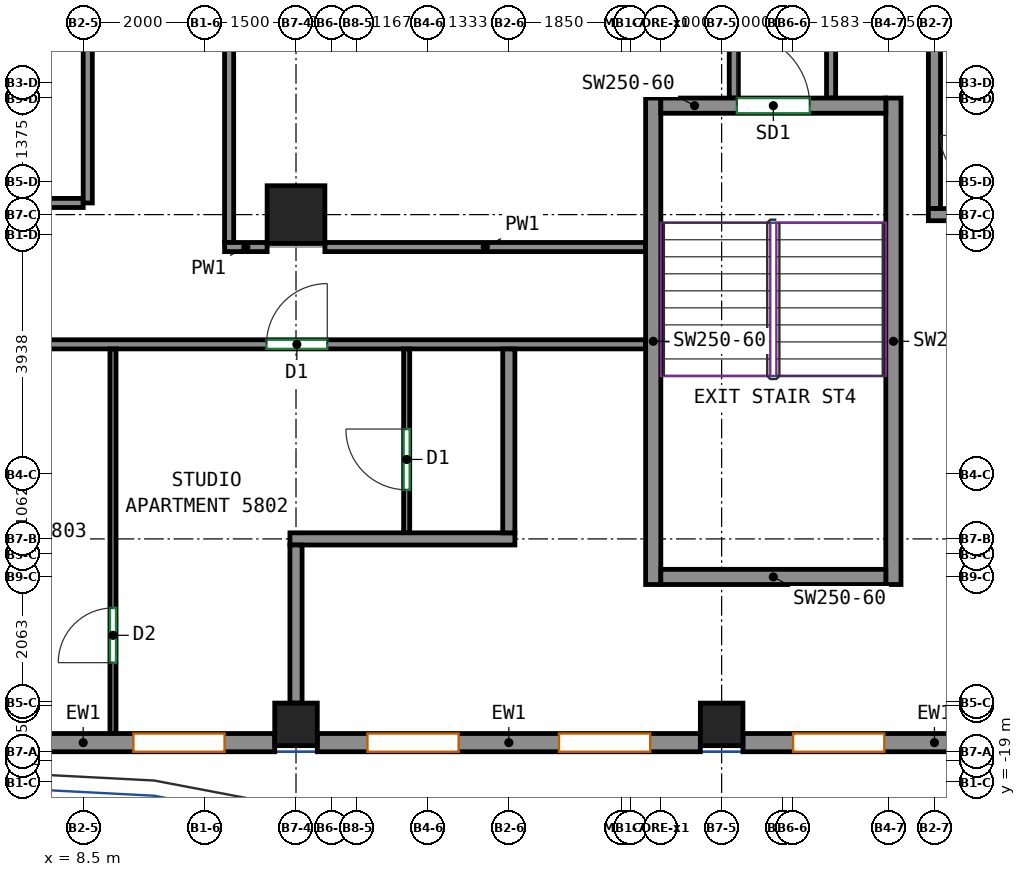
"""IFC4 building model, lengths in metres.
Left out: names, types, materials, properties, quantities, classifications, styles, units other than length and angle.
Written with IfcOpenShell. Run it as: python <this file> out.ifc"""

import sys

from ifc_helpers import new_model, si_unit, direction, frame, frame_2d, origin, origin_2d, place, context, subcontext, project, spatial, rectangle, extrude, source, transform, mapped, element, fill, save


model = new_model("IFC4")
c1 = context("Model", 3, precision=1e-05, world=origin(), true_north=direction((0.0, 1.0)))
c2 = subcontext(c1, "Body", "Model", "MODEL_VIEW")
j1 = project(units=[si_unit("LENGTHUNIT", "METRE"), si_unit("PLANEANGLEUNIT", "RADIAN")], contexts=[c1])
p1 = place(None, origin())
s1 = spatial("IfcSite", under=j1, at=p1, CompositionType="ELEMENT")
p2 = place(p1, origin())
s2 = spatial("IfcBuilding", under=s1, at=p2, CompositionType="ELEMENT")
p3 = place(p2, frame((0.0, 0.0, 242.4)))
s3 = spatial("IfcBuildingStorey", under=s2, at=p3, CompositionType="ELEMENT", Elevation=242.4)
m1 = source(origin(), c2, "Body", "SweptSolid", [
    extrude(rectangle(XDim=0.7, YDim=0.7, at=origin_2d()), origin(), (0.0, 0.0, 1.0), 3.12),
])
p4 = place(p3, frame((12.0, -18.05, 0.0), z_axis=(0.0, 0.0, 1.0), x_axis=(1.0, 0.0, 0.0)))
e1 = element("IfcColumn", 1, at=p4, inside=s3, PredefinedType="COLUMN", context=c2, shape_type="MappedRepresentation", body=[
    mapped(m1, transform((0.0, 0.0, 0.0))),
])
m2 = source(origin(), c2, "Body", "SweptSolid", [
    extrude(rectangle(XDim=0.95, YDim=0.95, at=origin_2d()), origin(), (0.0, 0.0, 1.0), 3.12),
])
p5 = place(p3, frame((12.0, -9.667, 0.0), z_axis=(0.0, 0.0, 1.0), x_axis=(1.0, 0.0, 0.0)))
e2 = element("IfcColumn", 2, at=p5, inside=s3, PredefinedType="COLUMN", context=c2, shape_type="MappedRepresentation", body=[
    mapped(m2, transform((0.0, 0.0, 0.0))),
])
p6 = place(p3, frame((19.0, -18.05, 0.0), z_axis=(0.0, 0.0, 1.0), x_axis=(1.0, 0.0, 0.0)))
e3 = element("IfcColumn", 3, at=p6, inside=s3, PredefinedType="COLUMN", context=c2, shape_type="MappedRepresentation", body=[
    mapped(m1, transform((0.0, 0.0, 0.0))),
])
m3 = source(origin(), c2, "Body", "SweptSolid", [
    extrude(rectangle(XDim=8.0, YDim=0.25, at=frame_2d((4.0, 0.0))), origin(), (0.0, 0.0, 1.0), 3.12),
])
for number, where, z_axis, x_axis in (
    (4, (17.875, -15.75, 0.0), (0.0, 0.0, 1.0), (0.0, 1.0, 0.0)),
    (5, (21.825, -15.75, 0.0), (0.0, 0.0, 1.0), (0.0, 1.0, 0.0)),
):
    element("IfcWall", number, at=place(p3, frame(where, z_axis=z_axis, x_axis=x_axis)), inside=s3, PredefinedType="SHEAR", context=c2, shape_type="MappedRepresentation", body=[
        mapped(m3, transform((0.0, 0.0, 0.0))),
    ])
m4 = source(origin(), c2, "Body", "SweptSolid", [
    extrude(rectangle(XDim=3.7, YDim=0.25, at=frame_2d((1.85, 0.0))), origin(), (0.0, 0.0, 1.0), 3.12),
])
p7 = place(p3, frame((18.0, -15.625, 0.0), z_axis=(0.0, 0.0, 1.0), x_axis=(1.0, 0.0, 0.0)))
e6 = element("IfcWall", 6, at=p7, inside=s3, PredefinedType="SHEAR", context=c2, shape_type="MappedRepresentation", body=[
    mapped(m4, transform((0.0, 0.0, 0.0))),
])
p8 = place(p3, frame((18.0, -7.875, 0.0), z_axis=(0.0, 0.0, 1.0), x_axis=(1.0, 0.0, 0.0)))
e7 = element("IfcWall", 7, at=p8, inside=s3, PredefinedType="SHEAR", context=c2, shape_type="MappedRepresentation", body=[
    mapped(m4, transform((0.0, 0.0, 0.0))),
])
p9 = place(p8, frame((1.25, 0.0, 0.0)))
e8 = element("IfcOpeningElement", 8, at=p9, cuts=e7, PredefinedType="OPENING", context=c2, shape_type="SweptSolid", body=[
    extrude(rectangle(XDim=1.2, YDim=2.1, at=frame_2d((0.6, 1.05))), frame((0.0, 0.135, 0.0), z_axis=(0.0, -1.0, 0.0), x_axis=(1.0, 0.0, 0.0)), (0.0, 0.0, 1.0), 0.27),
])
m5 = source(origin(), c2, "Body", "SweptSolid", [
    extrude(rectangle(XDim=6.3, YDim=0.3, at=frame_2d((3.15, 0.0))), origin(), (0.0, 0.0, 1.0), 3.12),
])
p10 = place(p3, frame((5.35, -18.35, 0.0), z_axis=(0.0, 0.0, 1.0), x_axis=(1.0, 0.0, 0.0)))
e9 = element("IfcWall", 9, at=p10, inside=s3, PredefinedType="SOLIDWALL", context=c2, shape_type="MappedRepresentation", body=[
    mapped(m5, transform((0.0, 0.0, 0.0))),
])
p11 = place(p10, frame((0.825, 0.0, 0.8)))
e10 = element("IfcOpeningElement", 10, at=p11, cuts=e9, PredefinedType="OPENING", context=c2, shape_type="SweptSolid", body=[
    extrude(rectangle(XDim=1.5, YDim=2.05, at=frame_2d((0.75, 1.025))), frame((0.0, 0.16, 0.0), z_axis=(0.0, -1.0, 0.0), x_axis=(1.0, 0.0, 0.0)), (0.0, 0.0, 1.0), 0.32),
])
p12 = place(p10, frame((3.975, 0.0, 0.8)))
e11 = element("IfcOpeningElement", 11, at=p12, cuts=e9, PredefinedType="OPENING", context=c2, shape_type="SweptSolid", body=[
    extrude(rectangle(XDim=1.5, YDim=2.05, at=frame_2d((0.75, 1.025))), frame((0.0, 0.16, 0.0), z_axis=(0.0, -1.0, 0.0), x_axis=(1.0, 0.0, 0.0)), (0.0, 0.0, 1.0), 0.32),
])
p13 = place(p3, frame((12.35, -18.35, 0.0), z_axis=(0.0, 0.0, 1.0), x_axis=(1.0, 0.0, 0.0)))
e12 = element("IfcWall", 12, at=p13, inside=s3, PredefinedType="SOLIDWALL", context=c2, shape_type="MappedRepresentation", body=[
    mapped(m5, transform((0.0, 0.0, 0.0))),
])
p14 = place(p13, frame((0.825, 0.0, 0.8)))
e13 = element("IfcOpeningElement", 13, at=p14, cuts=e12, PredefinedType="OPENING", context=c2, shape_type="SweptSolid", body=[
    extrude(rectangle(XDim=1.5, YDim=2.05, at=frame_2d((0.75, 1.025))), frame((0.0, 0.16, 0.0), z_axis=(0.0, -1.0, 0.0), x_axis=(1.0, 0.0, 0.0)), (0.0, 0.0, 1.0), 0.32),
])
p15 = place(p13, frame((3.975, 0.0, 0.8)))
e14 = element("IfcOpeningElement", 14, at=p15, cuts=e12, PredefinedType="OPENING", context=c2, shape_type="SweptSolid", body=[
    extrude(rectangle(XDim=1.5, YDim=2.05, at=frame_2d((0.75, 1.025))), frame((0.0, 0.16, 0.0), z_axis=(0.0, -1.0, 0.0), x_axis=(1.0, 0.0, 0.0)), (0.0, 0.0, 1.0), 0.32),
])
p16 = place(p3, frame((19.35, -18.35, 0.0), z_axis=(0.0, 0.0, 1.0), x_axis=(1.0, 0.0, 0.0)))
e15 = element("IfcWall", 15, at=p16, inside=s3, PredefinedType="SOLIDWALL", context=c2, shape_type="MappedRepresentation", body=[
    mapped(m5, transform((0.0, 0.0, 0.0))),
])
p17 = place(p16, frame((0.825, 0.0, 0.8)))
e16 = element("IfcOpeningElement", 16, at=p17, cuts=e15, PredefinedType="OPENING", context=c2, shape_type="SweptSolid", body=[
    extrude(rectangle(XDim=1.5, YDim=2.05, at=frame_2d((0.75, 1.025))), frame((0.0, 0.16, 0.0), z_axis=(0.0, -1.0, 0.0), x_axis=(1.0, 0.0, 0.0)), (0.0, 0.0, 1.0), 0.32),
])
p18 = place(p16, frame((3.975, 0.0, 0.8)))
e17 = element("IfcOpeningElement", 17, at=p18, cuts=e15, PredefinedType="OPENING", context=c2, shape_type="SweptSolid", body=[
    extrude(rectangle(XDim=1.5, YDim=2.05, at=frame_2d((0.75, 1.025))), frame((0.0, 0.16, 0.0), z_axis=(0.0, -1.0, 0.0), x_axis=(1.0, 0.0, 0.0)), (0.0, 0.0, 1.0), 0.32),
])
p19 = place(p3, frame((-11.8, -11.8, 0.0), z_axis=(0.0, 0.0, 1.0), x_axis=(1.0, 0.0, 0.0)))
e18 = element("IfcWall", 18, at=p19, inside=s3, PredefinedType="PARTITIONING", context=c2, shape_type="SweptSolid", body=[
    extrude(rectangle(XDim=29.55, YDim=0.15, at=frame_2d((14.775, 0.0))), origin(), (0.0, 0.0, 1.0), 3.12),
])
p20 = place(p19, frame((4.802, 0.0, 0.0)))
e19 = element("IfcOpeningElement", 19, at=p20, cuts=e18, PredefinedType="OPENING", context=c2, shape_type="SweptSolid", body=[
    extrude(rectangle(XDim=1.0, YDim=2.1, at=frame_2d((0.5, 1.05))), frame((0.0, 0.085, 0.0), z_axis=(0.0, -1.0, 0.0), x_axis=(1.0, 0.0, 0.0)), (0.0, 0.0, 1.0), 0.17),
])
p21 = place(p19, frame((23.314, 0.0, 0.0)))
e20 = element("IfcOpeningElement", 20, at=p21, cuts=e18, PredefinedType="OPENING", context=c2, shape_type="SweptSolid", body=[
    extrude(rectangle(XDim=1.0, YDim=2.1, at=frame_2d((0.5, 1.05))), frame((0.0, 0.085, 0.0), z_axis=(0.0, -1.0, 0.0), x_axis=(1.0, 0.0, 0.0)), (0.0, 0.0, 1.0), 0.17),
])
p22 = place(p3, frame((20.8, -7.75, 0.0), z_axis=(0.0, 0.0, 1.0), x_axis=(0.0, 1.0, 0.0)))
e21 = element("IfcWall", 21, at=p22, inside=s3, PredefinedType="PARTITIONING", context=c2, shape_type="SweptSolid", body=[
    extrude(rectangle(XDim=2.41, YDim=0.15, at=frame_2d((1.205, 0.0))), origin(), (0.0, 0.0, 1.0), 3.12),
])
p23 = place(p22, frame((0.805, 0.0, 0.0)))
e22 = element("IfcOpeningElement", 22, at=p23, cuts=e21, PredefinedType="OPENING", context=c2, shape_type="SweptSolid", body=[
    extrude(rectangle(XDim=0.9, YDim=2.1, at=frame_2d((0.45, 1.05))), frame((0.0, 0.085, 0.0), z_axis=(0.0, -1.0, 0.0), x_axis=(1.0, 0.0, 0.0)), (0.0, 0.0, 1.0), 0.17),
])
p24 = place(p3, frame((19.2, -7.75, 0.0), z_axis=(0.0, 0.0, 1.0), x_axis=(0.0, 1.0, 0.0)))
e23 = element("IfcWall", 23, at=p24, inside=s3, PredefinedType="PARTITIONING", context=c2, shape_type="SweptSolid", body=[
    extrude(rectangle(XDim=6.442, YDim=0.15, at=frame_2d((3.221, 0.0))), origin(), (0.0, 0.0, 1.0), 3.12),
])
p25 = place(p3, frame((10.9, -10.125, 0.0), z_axis=(0.0, 0.0, 1.0), x_axis=(0.0, 1.0, 0.0)))
e24 = element("IfcWall", 24, at=p25, inside=s3, PredefinedType="PARTITIONING", context=c2, shape_type="SweptSolid", body=[
    extrude(rectangle(XDim=13.4, YDim=0.15, at=frame_2d((6.7, 0.0))), origin(), (0.0, 0.0, 1.0), 3.12),
])
p26 = place(p25, frame((9.8, 0.0, 0.0)))
e25 = element("IfcOpeningElement", 25, at=p26, cuts=e24, PredefinedType="OPENING", context=c2, shape_type="SweptSolid", body=[
    extrude(rectangle(XDim=0.9, YDim=2.1, at=frame_2d((0.45, 1.05))), frame((0.0, 0.085, 0.0), z_axis=(0.0, -1.0, 0.0), x_axis=(1.0, 0.0, 0.0)), (0.0, 0.0, 1.0), 0.17),
])
p27 = place(p3, frame((12.475, -10.2, 0.0), z_axis=(0.0, 0.0, 1.0), x_axis=(1.0, 0.0, 0.0)))
e26 = element("IfcWall", 26, at=p27, inside=s3, PredefinedType="PARTITIONING", context=c2, shape_type="SweptSolid", body=[
    extrude(rectangle(XDim=5.275, YDim=0.15, at=frame_2d((2.637, 0.0))), origin(), (0.0, 0.0, 1.0), 3.12),
])
p28 = place(p3, frame((10.825, -10.2, 0.0), z_axis=(0.0, 0.0, 1.0), x_axis=(1.0, 0.0, 0.0)))
e27 = element("IfcWall", 27, at=p28, inside=s3, PredefinedType="PARTITIONING", context=c2, shape_type="SweptSolid", body=[
    extrude(rectangle(XDim=0.7, YDim=0.15, at=frame_2d((0.35, 0.0))), origin(), (0.0, 0.0, 1.0), 3.12),
])
p29 = place(p3, frame((8.99, -18.25, 0.0), z_axis=(0.0, 0.0, 1.0), x_axis=(0.0, 1.0, 0.0)))
e28 = element("IfcWall", 28, at=p29, inside=s3, PredefinedType="PARTITIONING", context=c2, shape_type="SweptSolid", body=[
    extrude(rectangle(XDim=6.373, YDim=0.1, at=frame_2d((3.187, 0.0))), origin(), (0.0, 0.0, 1.0), 3.12),
])
p30 = place(p29, frame((1.215, 0.0, 0.0)))
e29 = element("IfcOpeningElement", 29, at=p30, cuts=e28, PredefinedType="OPENING", context=c2, shape_type="SweptSolid", body=[
    extrude(rectangle(XDim=0.9, YDim=2.1, at=frame_2d((0.45, 1.05))), frame((0.0, 0.06, 0.0), z_axis=(0.0, -1.0, 0.0), x_axis=(1.0, 0.0, 0.0)), (0.0, 0.0, 1.0), 0.12),
])
p31 = place(p3, frame((13.82, -14.9, 0.0), z_axis=(0.0, 0.0, 1.0), x_axis=(0.0, 1.0, 0.0)))
e30 = element("IfcWall", 30, at=p31, inside=s3, PredefinedType="PARTITIONING", context=c2, shape_type="SweptSolid", body=[
    extrude(rectangle(XDim=3.023, YDim=0.1, at=frame_2d((1.511, 0.0))), origin(), (0.0, 0.0, 1.0), 3.12),
])
p32 = place(p31, frame((0.707, 0.0, 0.0)))
e31 = element("IfcOpeningElement", 31, at=p32, cuts=e30, PredefinedType="OPENING", context=c2, shape_type="SweptSolid", body=[
    extrude(rectangle(XDim=1.0, YDim=2.1, at=frame_2d((0.5, 1.05))), frame((0.0, 0.06, 0.0), z_axis=(0.0, -1.0, 0.0), x_axis=(1.0, 0.0, 0.0)), (0.0, 0.0, 1.0), 0.12),
])
p33 = place(p3, frame((11.9, -15.0, 0.0), z_axis=(0.0, 0.0, 1.0), x_axis=(1.0, 0.0, 0.0)))
e32 = element("IfcWall", 32, at=p33, inside=s3, PredefinedType="PARTITIONING", context=c2, shape_type="SweptSolid", body=[
    extrude(rectangle(XDim=3.7, YDim=0.2, at=frame_2d((1.85, 0.0))), origin(), (0.0, 0.0, 1.0), 3.12),
])
p34 = place(p3, frame((12.0, -17.7, 0.0), z_axis=(0.0, 0.0, 1.0), x_axis=(0.0, 1.0, 0.0)))
e33 = element("IfcWall", 33, at=p34, inside=s3, PredefinedType="PARTITIONING", context=c2, shape_type="SweptSolid", body=[
    extrude(rectangle(XDim=2.6, YDim=0.2, at=frame_2d((1.3, 0.0))), origin(), (0.0, 0.0, 1.0), 3.12),
])
p35 = place(p3, frame((15.5, -14.9, 0.0), z_axis=(0.0, 0.0, 1.0), x_axis=(0.0, 1.0, 0.0)))
e34 = element("IfcWall", 34, at=p35, inside=s3, PredefinedType="PARTITIONING", context=c2, shape_type="SweptSolid", body=[
    extrude(rectangle(XDim=3.023, YDim=0.2, at=frame_2d((1.511, 0.0))), origin(), (0.0, 0.0, 1.0), 3.12),
])
p36 = place(p3, frame((22.5, -9.567, 0.0), z_axis=(0.0, 0.0, 1.0), x_axis=(0.0, 1.0, 0.0)))
e35 = element("IfcWall", 35, at=p36, inside=s3, PredefinedType="PARTITIONING", context=c2, shape_type="SweptSolid", body=[
    extrude(rectangle(XDim=4.217, YDim=0.2, at=frame_2d((2.108, 0.0))), origin(), (0.0, 0.0, 1.0), 3.12),
])
p37 = place(p3, frame((22.4, -9.667, 0.0), z_axis=(0.0, 0.0, 1.0), x_axis=(1.0, 0.0, 0.0)))
e36 = element("IfcWall", 36, at=p37, inside=s3, PredefinedType="PARTITIONING", context=c2, shape_type="SweptSolid", body=[
    extrude(rectangle(XDim=6.3, YDim=0.2, at=frame_2d((3.15, 0.0))), origin(), (0.0, 0.0, 1.0), 3.12),
])
p38 = place(p3, frame((8.5, -9.475, 0.0), z_axis=(0.0, 0.0, 1.0), x_axis=(-1.0, 0.0, 0.0)))
e37 = element("IfcWall", 37, at=p38, inside=s3, PredefinedType="PARTITIONING", context=c2, shape_type="SweptSolid", body=[
    extrude(rectangle(XDim=15.075, YDim=0.15, at=frame_2d((7.538, 0.0))), origin(), (0.0, 0.0, 1.0), 2.57),
])
p39 = place(p3, frame((8.575, 5.675, 0.0), z_axis=(0.0, 0.0, 1.0), x_axis=(0.0, -1.0, 0.0)))
e38 = element("IfcWall", 38, at=p39, inside=s3, PredefinedType="PARTITIONING", context=c2, shape_type="SweptSolid", body=[
    extrude(rectangle(XDim=15.15, YDim=0.15, at=frame_2d((7.575, 0.0))), origin(), (0.0, 0.0, 1.0), 3.12),
])
p40 = place(p12, origin())
e39 = element("IfcWindow", 39, at=p40, inside=s3, PartitioningType="SINGLE_PANEL", PredefinedType="WINDOW", context=c2, shape_type="SweptSolid", body=[
    extrude(rectangle(XDim=1.5, YDim=2.05, at=frame_2d((0.75, 1.025))), frame((0.0, 0.03, 0.0), z_axis=(0.0, -1.0, 0.0), x_axis=(1.0, 0.0, 0.0)), (0.0, 0.0, 1.0), 0.06),
])
fill(e11, e39)
p41 = place(p14, origin())
e40 = element("IfcWindow", 40, at=p41, inside=s3, PartitioningType="SINGLE_PANEL", PredefinedType="WINDOW", context=c2, shape_type="SweptSolid", body=[
    extrude(rectangle(XDim=1.5, YDim=2.05, at=frame_2d((0.75, 1.025))), frame((0.0, 0.03, 0.0), z_axis=(0.0, -1.0, 0.0), x_axis=(1.0, 0.0, 0.0)), (0.0, 0.0, 1.0), 0.06),
])
fill(e13, e40)
p42 = place(p15, origin())
e41 = element("IfcWindow", 41, at=p42, inside=s3, PartitioningType="SINGLE_PANEL", PredefinedType="WINDOW", context=c2, shape_type="SweptSolid", body=[
    extrude(rectangle(XDim=1.5, YDim=2.05, at=frame_2d((0.75, 1.025))), frame((0.0, 0.03, 0.0), z_axis=(0.0, -1.0, 0.0), x_axis=(1.0, 0.0, 0.0)), (0.0, 0.0, 1.0), 0.06),
])
fill(e14, e41)
p43 = place(p17, origin())
e42 = element("IfcWindow", 42, at=p43, inside=s3, PartitioningType="SINGLE_PANEL", PredefinedType="WINDOW", context=c2, shape_type="SweptSolid", body=[
    extrude(rectangle(XDim=1.5, YDim=2.05, at=frame_2d((0.75, 1.025))), frame((0.0, 0.03, 0.0), z_axis=(0.0, -1.0, 0.0), x_axis=(1.0, 0.0, 0.0)), (0.0, 0.0, 1.0), 0.06),
])
fill(e16, e42)
p44 = place(p9, origin())
e43 = element("IfcDoor", 43, at=p44, inside=s3, OperationType="DOUBLE_DOOR_SINGLE_SWING", PredefinedType="DOOR", context=c2, shape_type="SweptSolid", body=[
    extrude(rectangle(XDim=1.2, YDim=2.1, at=frame_2d((0.6, 1.05))), frame((0.0, 0.025, 0.0), z_axis=(0.0, -1.0, 0.0), x_axis=(1.0, 0.0, 0.0)), (0.0, 0.0, 1.0), 0.05),
])
fill(e8, e43)
p45 = place(p30, origin())
e44 = element("IfcDoor", 44, at=p45, inside=s3, OperationType="SINGLE_SWING_LEFT", PredefinedType="DOOR", context=c2, shape_type="SweptSolid", body=[
    extrude(rectangle(XDim=0.9, YDim=2.1, at=frame_2d((0.45, 1.05))), frame((0.0, 0.025, 0.0), z_axis=(0.0, -1.0, 0.0), x_axis=(1.0, 0.0, 0.0)), (0.0, 0.0, 1.0), 0.05),
])
fill(e29, e44)
p46 = place(p32, origin())
e45 = element("IfcDoor", 45, at=p46, inside=s3, OperationType="SINGLE_SWING_RIGHT", PredefinedType="DOOR", context=c2, shape_type="SweptSolid", body=[
    extrude(rectangle(XDim=1.0, YDim=2.1, at=frame_2d((0.5, 1.05))), frame((0.0, 0.025, 0.0), z_axis=(0.0, -1.0, 0.0), x_axis=(1.0, 0.0, 0.0)), (0.0, 0.0, 1.0), 0.05),
])
fill(e31, e45)
p47 = place(p21, origin())
e46 = element("IfcDoor", 46, at=p47, inside=s3, OperationType="SINGLE_SWING_RIGHT", PredefinedType="DOOR", context=c2, shape_type="SweptSolid", body=[
    extrude(rectangle(XDim=1.0, YDim=2.1, at=frame_2d((0.5, 1.05))), frame((0.0, 0.025, 0.0), z_axis=(0.0, -1.0, 0.0), x_axis=(1.0, 0.0, 0.0)), (0.0, 0.0, 1.0), 0.05),
])
fill(e20, e46)
save(model, sys.argv[1])
